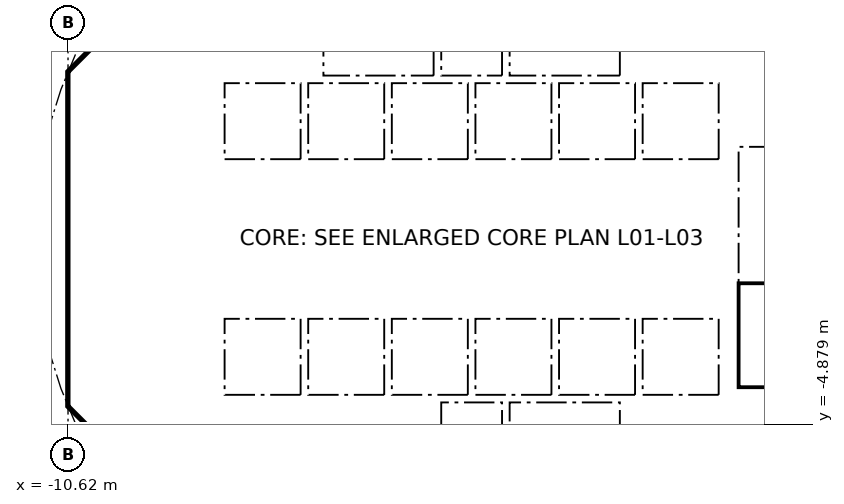
"""IFC4 building model, lengths in metres.
Left out: names, types, materials, properties, quantities, classifications, styles, units other than length and angle.
Written with IfcOpenShell. Run it as: python <this file> out.ifc"""

import sys

from ifc_helpers import new_model, si_unit, direction, frame, frame_2d, origin, place, context, subcontext, project, spatial, polyline, rectangle, outline, extrude, element, fill, save


model = new_model("IFC4")
c1 = context("Model", 3, precision=1e-05, world=origin(), true_north=direction((0.0, 1.0)))
c2 = subcontext(c1, "Body", "Model", "MODEL_VIEW")
j1 = project(units=[si_unit("LENGTHUNIT", "METRE"), si_unit("PLANEANGLEUNIT", "RADIAN")], contexts=[c1])
p1 = place(None, origin())
s1 = spatial("IfcSite", under=j1, at=p1, CompositionType="ELEMENT")
p2 = place(p1, origin())
s2 = spatial("IfcBuilding", under=s1, at=p2, CompositionType="ELEMENT")
p3 = place(p2, frame((0.0, 0.0, 12.0)))
s3 = spatial("IfcBuildingStorey", under=s2, at=p3, CompositionType="ELEMENT", Elevation=12.0)
p4 = place(p3, frame((9.988, 4.613, 0.0), z_axis=(0.0, 0.0, 1.0), x_axis=(-0.707106781187, 0.707106781187, 0.0)))
e1 = element("IfcWall", 1, at=p4, inside=s3, PredefinedType="SHEAR", context=c2, shape_type="SweptSolid", body=[
    extrude(rectangle(XDim=7.602, YDim=0.6, at=frame_2d((3.801, 0.0))), origin(), (0.0, 0.0, 1.0), 4.7),
])
p5 = place(p4, frame((3.201, 0.0, 0.0)))
e2 = element("IfcOpeningElement", 2, at=p5, cuts=e1, PredefinedType="OPENING", context=c2, shape_type="SweptSolid", body=[
    extrude(rectangle(XDim=1.2, YDim=2.1, at=frame_2d((0.6, 1.05))), frame((0.0, 0.31, 0.0), z_axis=(0.0, -1.0, 0.0), x_axis=(1.0, 0.0, 0.0)), (0.0, 0.0, 1.0), 0.62),
])
p6 = place(p3, frame((-4.613, 9.988, 0.0), z_axis=(0.0, 0.0, 1.0), x_axis=(-0.707106781187, -0.707106781187, 0.0)))
e3 = element("IfcWall", 3, at=p6, inside=s3, PredefinedType="SHEAR", context=c2, shape_type="SweptSolid", body=[
    extrude(rectangle(XDim=7.602, YDim=0.6, at=frame_2d((3.801, 0.0))), origin(), (0.0, 0.0, 1.0), 4.7),
])
p7 = place(p6, frame((0.351, 0.0, 0.0)))
e4 = element("IfcOpeningElement", 4, at=p7, cuts=e3, PredefinedType="OPENING", context=c2, shape_type="SweptSolid", body=[
    extrude(rectangle(XDim=1.1, YDim=2.1, at=frame_2d((0.55, 1.05))), frame((0.0, 0.31, 0.0), z_axis=(0.0, -1.0, 0.0), x_axis=(1.0, 0.0, 0.0)), (0.0, 0.0, 1.0), 0.62),
])
p8 = place(p3, frame((-10.325, 3.801, 0.0), z_axis=(0.0, 0.0, 1.0), x_axis=(0.0, -1.0, 0.0)))
e5 = element("IfcWall", 5, at=p8, inside=s3, PredefinedType="SHEAR", context=c2, shape_type="SweptSolid", body=[
    extrude(rectangle(XDim=7.602, YDim=0.6, at=frame_2d((3.801, 0.0))), origin(), (0.0, 0.0, 1.0), 4.7),
])
p9 = place(p8, frame((0.651, 0.0, 0.0)))
e6 = element("IfcOpeningElement", 6, at=p9, cuts=e5, PredefinedType="OPENING", context=c2, shape_type="SweptSolid", body=[
    extrude(rectangle(XDim=1.5, YDim=2.1, at=frame_2d((0.75, 1.05))), frame((0.0, 0.31, 0.0), z_axis=(0.0, -1.0, 0.0), x_axis=(1.0, 0.0, 0.0)), (0.0, 0.0, 1.0), 0.62),
])
p10 = place(p8, frame((5.451, 0.0, 0.0)))
e7 = element("IfcOpeningElement", 7, at=p10, cuts=e5, PredefinedType="OPENING", context=c2, shape_type="SweptSolid", body=[
    extrude(rectangle(XDim=1.5, YDim=2.1, at=frame_2d((0.75, 1.05))), frame((0.0, 0.31, 0.0), z_axis=(0.0, -1.0, 0.0), x_axis=(1.0, 0.0, 0.0)), (0.0, 0.0, 1.0), 0.62),
])
p11 = place(p3, frame((-9.988, -4.613, 0.0), z_axis=(0.0, 0.0, 1.0), x_axis=(0.707106781187, -0.707106781187, 0.0)))
e8 = element("IfcWall", 8, at=p11, inside=s3, PredefinedType="SHEAR", context=c2, shape_type="SweptSolid", body=[
    extrude(rectangle(XDim=7.602, YDim=0.6, at=frame_2d((3.801, 0.0))), origin(), (0.0, 0.0, 1.0), 4.7),
])
p12 = place(p11, frame((6.151, 0.0, 0.0)))
e9 = element("IfcOpeningElement", 9, at=p12, cuts=e8, PredefinedType="OPENING", context=c2, shape_type="SweptSolid", body=[
    extrude(rectangle(XDim=1.1, YDim=2.1, at=frame_2d((0.55, 1.05))), frame((0.0, 0.31, 0.0), z_axis=(0.0, -1.0, 0.0), x_axis=(1.0, 0.0, 0.0)), (0.0, 0.0, 1.0), 0.62),
])
p13 = place(p3, frame((4.613, -9.988, 0.0), z_axis=(0.0, 0.0, 1.0), x_axis=(0.707106781187, 0.707106781187, 0.0)))
e10 = element("IfcWall", 10, at=p13, inside=s3, PredefinedType="SHEAR", context=c2, shape_type="SweptSolid", body=[
    extrude(rectangle(XDim=7.602, YDim=0.6, at=frame_2d((3.801, 0.0))), origin(), (0.0, 0.0, 1.0), 4.7),
])
p14 = place(p13, frame((3.201, 0.0, 0.0)))
e11 = element("IfcOpeningElement", 11, at=p14, cuts=e10, PredefinedType="OPENING", context=c2, shape_type="SweptSolid", body=[
    extrude(rectangle(XDim=1.2, YDim=2.1, at=frame_2d((0.6, 1.05))), frame((0.0, 0.31, 0.0), z_axis=(0.0, -1.0, 0.0), x_axis=(1.0, 0.0, 0.0)), (0.0, 0.0, 1.0), 0.62),
])
p15 = place(p3, frame((-5.8, 4.3, 0.0), z_axis=(0.0, 0.0, 1.0), x_axis=(0.0, 1.0, 0.0)))
e12 = element("IfcWall", 12, at=p15, inside=s3, PredefinedType="PARTITIONING", context=c2, shape_type="SweptSolid", body=[
    extrude(rectangle(XDim=3.927, YDim=0.15, at=frame_2d((1.963, 0.0))), origin(), (0.0, 0.0, 1.0), 4.7),
])
p16 = place(p15, frame((1.551, 0.0, 0.0)))
e13 = element("IfcOpeningElement", 13, at=p16, cuts=e12, PredefinedType="OPENING", context=c2, shape_type="SweptSolid", body=[
    extrude(rectangle(XDim=0.9, YDim=2.1, at=frame_2d((0.45, 1.05))), frame((0.0, 0.085, 0.0), z_axis=(0.0, -1.0, 0.0), x_axis=(1.0, 0.0, 0.0)), (0.0, 0.0, 1.0), 0.17),
])
p17 = place(p3, frame((4.0, 4.3, 0.0), z_axis=(0.0, 0.0, 1.0), x_axis=(0.0, 1.0, 0.0)))
e14 = element("IfcWall", 14, at=p17, inside=s3, PredefinedType="SOLIDWALL", context=c2, shape_type="SweptSolid", body=[
    extrude(rectangle(XDim=2.2, YDim=0.2, at=frame_2d((1.1, 0.0))), origin(), (0.0, 0.0, 1.0), 4.7),
])
p18 = place(p17, frame((0.55, 0.0, 0.0)))
e15 = element("IfcOpeningElement", 15, at=p18, cuts=e14, PredefinedType="OPENING", context=c2, shape_type="SweptSolid", body=[
    extrude(rectangle(XDim=1.1, YDim=2.1, at=frame_2d((0.55, 1.05))), frame((0.0, 0.11, 0.0), z_axis=(0.0, -1.0, 0.0), x_axis=(1.0, 0.0, 0.0)), (0.0, 0.0, 1.0), 0.22),
])
p19 = place(p3, frame((-4.0, 4.3, 0.0), z_axis=(0.0, 0.0, 1.0), x_axis=(0.0, 1.0, 0.0)))
e16 = element("IfcWall", 16, at=p19, inside=s3, PredefinedType="SOLIDWALL", context=c2, shape_type="SweptSolid", body=[
    extrude(rectangle(XDim=2.2, YDim=0.2, at=frame_2d((1.1, 0.0))), origin(), (0.0, 0.0, 1.0), 4.7),
])
p20 = place(p19, frame((0.55, 0.0, 0.0)))
e17 = element("IfcOpeningElement", 17, at=p20, cuts=e16, PredefinedType="OPENING", context=c2, shape_type="SweptSolid", body=[
    extrude(rectangle(XDim=1.1, YDim=2.1, at=frame_2d((0.55, 1.05))), frame((0.0, 0.11, 0.0), z_axis=(0.0, -1.0, 0.0), x_axis=(1.0, 0.0, 0.0)), (0.0, 0.0, 1.0), 0.22),
])
p21 = place(p3, frame((-6.7, 2.0, 0.0), z_axis=(0.0, 0.0, 1.0), x_axis=(1.0, 0.0, 0.0)))
e18 = element("IfcWall", 18, at=p21, inside=s3, PredefinedType="SOLIDWALL", context=c2, shape_type="SweptSolid", body=[
    extrude(rectangle(XDim=13.4, YDim=0.2, at=frame_2d((6.7, 0.0))), origin(), (0.0, 0.0, 1.0), 4.7),
])
p22 = place(p21, frame((0.65, 0.0, 0.0)))
e19 = element("IfcOpeningElement", 19, at=p22, cuts=e18, PredefinedType="OPENING", context=c2, shape_type="SweptSolid", body=[
    extrude(rectangle(XDim=1.1, YDim=2.1, at=frame_2d((0.55, 1.05))), frame((0.0, 0.11, 0.0), z_axis=(0.0, -1.0, 0.0), x_axis=(1.0, 0.0, 0.0)), (0.0, 0.0, 1.0), 0.22),
])
p23 = place(p21, frame((2.85, 0.0, 0.0)))
e20 = element("IfcOpeningElement", 20, at=p23, cuts=e18, PredefinedType="OPENING", context=c2, shape_type="SweptSolid", body=[
    extrude(rectangle(XDim=1.1, YDim=2.1, at=frame_2d((0.55, 1.05))), frame((0.0, 0.11, 0.0), z_axis=(0.0, -1.0, 0.0), x_axis=(1.0, 0.0, 0.0)), (0.0, 0.0, 1.0), 0.22),
])
p24 = place(p21, frame((5.05, 0.0, 0.0)))
e21 = element("IfcOpeningElement", 21, at=p24, cuts=e18, PredefinedType="OPENING", context=c2, shape_type="SweptSolid", body=[
    extrude(rectangle(XDim=1.1, YDim=2.1, at=frame_2d((0.55, 1.05))), frame((0.0, 0.11, 0.0), z_axis=(0.0, -1.0, 0.0), x_axis=(1.0, 0.0, 0.0)), (0.0, 0.0, 1.0), 0.22),
])
p25 = place(p3, frame((6.7, 4.0, 0.0), z_axis=(0.0, 0.0, 1.0), x_axis=(1.0, 0.0, 0.0)))
e22 = element("IfcWall", 22, at=p25, inside=s3, PredefinedType="SOLIDWALL", context=c2, shape_type="SweptSolid", body=[
    extrude(rectangle(XDim=3.325, YDim=0.2, at=frame_2d((1.662, 0.0))), origin(), (0.0, 0.0, 1.0), 4.7),
])
p26 = place(p25, frame((1.25, 0.0, 0.0)))
e23 = element("IfcOpeningElement", 23, at=p26, cuts=e22, PredefinedType="OPENING", context=c2, shape_type="SweptSolid", body=[
    extrude(rectangle(XDim=1.1, YDim=2.1, at=frame_2d((0.55, 1.05))), frame((0.0, 0.11, 0.0), z_axis=(0.0, -1.0, 0.0), x_axis=(1.0, 0.0, 0.0)), (0.0, 0.0, 1.0), 0.22),
])
p27 = place(p3, frame((-5.8, -8.227, 0.0), z_axis=(0.0, 0.0, 1.0), x_axis=(0.0, 1.0, 0.0)))
e24 = element("IfcWall", 24, at=p27, inside=s3, PredefinedType="PARTITIONING", context=c2, shape_type="SweptSolid", body=[
    extrude(rectangle(XDim=3.927, YDim=0.15, at=frame_2d((1.963, 0.0))), origin(), (0.0, 0.0, 1.0), 4.7),
])
p28 = place(p27, frame((1.476, 0.0, 0.0)))
e25 = element("IfcOpeningElement", 25, at=p28, cuts=e24, PredefinedType="OPENING", context=c2, shape_type="SweptSolid", body=[
    extrude(rectangle(XDim=0.9, YDim=2.1, at=frame_2d((0.45, 1.05))), frame((0.0, 0.085, 0.0), z_axis=(0.0, -1.0, 0.0), x_axis=(1.0, 0.0, 0.0)), (0.0, 0.0, 1.0), 0.17),
])
p29 = place(p3, frame((4.0, -6.5, 0.0), z_axis=(0.0, 0.0, 1.0), x_axis=(0.0, 1.0, 0.0)))
e26 = element("IfcWall", 26, at=p29, inside=s3, PredefinedType="SOLIDWALL", context=c2, shape_type="SweptSolid", body=[
    extrude(rectangle(XDim=2.2, YDim=0.2, at=frame_2d((1.1, 0.0))), origin(), (0.0, 0.0, 1.0), 4.7),
])
p30 = place(p29, frame((0.55, 0.0, 0.0)))
e27 = element("IfcOpeningElement", 27, at=p30, cuts=e26, PredefinedType="OPENING", context=c2, shape_type="SweptSolid", body=[
    extrude(rectangle(XDim=1.1, YDim=2.1, at=frame_2d((0.55, 1.05))), frame((0.0, 0.11, 0.0), z_axis=(0.0, -1.0, 0.0), x_axis=(1.0, 0.0, 0.0)), (0.0, 0.0, 1.0), 0.22),
])
p31 = place(p3, frame((-4.0, -6.5, 0.0), z_axis=(0.0, 0.0, 1.0), x_axis=(0.0, 1.0, 0.0)))
e28 = element("IfcWall", 28, at=p31, inside=s3, PredefinedType="SOLIDWALL", context=c2, shape_type="SweptSolid", body=[
    extrude(rectangle(XDim=2.2, YDim=0.2, at=frame_2d((1.1, 0.0))), origin(), (0.0, 0.0, 1.0), 4.7),
])
p32 = place(p31, frame((0.65, 0.0, 0.0)))
e29 = element("IfcOpeningElement", 29, at=p32, cuts=e28, PredefinedType="OPENING", context=c2, shape_type="SweptSolid", body=[
    extrude(rectangle(XDim=0.9, YDim=2.1, at=frame_2d((0.45, 1.05))), frame((0.0, 0.11, 0.0), z_axis=(0.0, -1.0, 0.0), x_axis=(1.0, 0.0, 0.0)), (0.0, 0.0, 1.0), 0.22),
])
p33 = place(p3, frame((-6.7, -2.0, 0.0), z_axis=(0.0, 0.0, 1.0), x_axis=(1.0, 0.0, 0.0)))
e30 = element("IfcWall", 30, at=p33, inside=s3, PredefinedType="SOLIDWALL", context=c2, shape_type="SweptSolid", body=[
    extrude(rectangle(XDim=13.4, YDim=0.2, at=frame_2d((6.7, 0.0))), origin(), (0.0, 0.0, 1.0), 4.7),
])
p34 = place(p33, frame((0.65, 0.0, 0.0)))
e31 = element("IfcOpeningElement", 31, at=p34, cuts=e30, PredefinedType="OPENING", context=c2, shape_type="SweptSolid", body=[
    extrude(rectangle(XDim=1.1, YDim=2.1, at=frame_2d((0.55, 1.05))), frame((0.0, 0.11, 0.0), z_axis=(0.0, -1.0, 0.0), x_axis=(1.0, 0.0, 0.0)), (0.0, 0.0, 1.0), 0.22),
])
p35 = place(p33, frame((2.85, 0.0, 0.0)))
e32 = element("IfcOpeningElement", 32, at=p35, cuts=e30, PredefinedType="OPENING", context=c2, shape_type="SweptSolid", body=[
    extrude(rectangle(XDim=1.1, YDim=2.1, at=frame_2d((0.55, 1.05))), frame((0.0, 0.11, 0.0), z_axis=(0.0, -1.0, 0.0), x_axis=(1.0, 0.0, 0.0)), (0.0, 0.0, 1.0), 0.22),
])
p36 = place(p3, origin())
e33 = element("IfcWall", 33, at=p36, inside=s3, PredefinedType="SHEAR", context=c2, shape_type="SweptSolid", body=[
    extrude(outline(polyline([(-10.625, -3.801), (-10.025, -3.801), (-10.025, -4.152), (-9.776, -4.401), (-10.2, -4.825), (-10.625, -4.401), (-10.625, -3.801)])), origin(), (0.0, 0.0, 1.0), 4.7),
])
p37 = place(p3, origin())
e34 = element("IfcWall", 34, at=p37, inside=s3, PredefinedType="SHEAR", context=c2, shape_type="SweptSolid", body=[
    extrude(outline(polyline([(-10.2, 4.825), (-9.776, 4.401), (-10.025, 4.152), (-10.025, 3.801), (-10.625, 3.801), (-10.625, 4.401), (-10.2, 4.825)])), origin(), (0.0, 0.0, 1.0), 4.7),
])
for number, where, z_axis, x_axis in (
    (35, (-0.9, -6.5, 0.0), (0.0, 0.0, 1.0), (0.0, 1.0, 0.0)),
    (36, (0.9, -6.5, 0.0), (0.0, 0.0, 1.0), (0.0, 1.0, 0.0)),
):
    element("IfcWall", number, at=place(p3, frame(where, z_axis=z_axis, x_axis=x_axis)), inside=s3, PredefinedType="SOLIDWALL", context=c2, shape_type="SweptSolid", body=[
        extrude(rectangle(XDim=2.2, YDim=0.2, at=frame_2d((1.1, 0.0))), origin(), (0.0, 0.0, 1.0), 4.7),
    ])
p38 = place(p3, origin())
e37 = element("IfcWall", 37, at=p38, inside=s3, PredefinedType="SOLIDWALL", context=c2, shape_type="SweptSolid", body=[
    extrude(outline(polyline([(-6.7, -2.1), (-6.5, -2.1), (-6.5, -4.1), (-4.5, -4.1), (-4.5, -2.1), (-4.3, -2.1), (-4.3, -4.1), (-2.3, -4.1), (-2.3, -2.1), (-2.1, -2.1), (-2.1, -4.1), (-0.1, -4.1), (-0.1, -2.1), (0.1, -2.1), (0.1, -4.1), (2.1, -4.1), (2.1, -2.1), (2.3, -2.1), (2.3, -4.1), (4.3, -4.1), (4.3, -2.1), (4.5, -2.1), (4.5, -4.1), (6.5, -4.1), (6.5, -2.1), (6.7, -2.1), (6.7, -4.3), (-6.7, -4.3), (-6.7, -2.1)])), origin(), (0.0, 0.0, 1.0), 4.7),
])
for number, where, z_axis, x_axis in (
    (38, (-0.9, 4.3, 0.0), (0.0, 0.0, 1.0), (0.0, 1.0, 0.0)),
    (39, (0.9, 4.3, 0.0), (0.0, 0.0, 1.0), (0.0, 1.0, 0.0)),
):
    element("IfcWall", number, at=place(p3, frame(where, z_axis=z_axis, x_axis=x_axis)), inside=s3, PredefinedType="SOLIDWALL", context=c2, shape_type="SweptSolid", body=[
        extrude(rectangle(XDim=2.2, YDim=0.2, at=frame_2d((1.1, 0.0))), origin(), (0.0, 0.0, 1.0), 4.7),
    ])
p39 = place(p3, origin())
e40 = element("IfcWall", 40, at=p39, inside=s3, PredefinedType="SOLIDWALL", context=c2, shape_type="SweptSolid", body=[
    extrude(outline(polyline([(-6.5, 2.1), (-6.7, 2.1), (-6.7, 4.3), (6.7, 4.3), (6.7, 2.1), (6.5, 2.1), (6.5, 4.1), (4.5, 4.1), (4.5, 2.1), (4.3, 2.1), (4.3, 4.1), (2.3, 4.1), (2.3, 2.1), (2.1, 2.1), (2.1, 4.1), (0.1, 4.1), (0.1, 2.1), (-0.1, 2.1), (-0.1, 4.1), (-2.1, 4.1), (-2.1, 2.1), (-2.3, 2.1), (-2.3, 4.1), (-4.3, 4.1), (-4.3, 2.1), (-4.5, 2.1), (-4.5, 4.1), (-6.5, 4.1), (-6.5, 2.1)])), origin(), (0.0, 0.0, 1.0), 4.7),
])
for number, where, z_axis, x_axis in (
    (41, (-10.025, -4.0, 0.0), (0.0, 0.0, 1.0), (1.0, 0.0, 0.0)),
    (42, (-10.025, 4.0, 0.0), (0.0, 0.0, 1.0), (1.0, 0.0, 0.0)),
):
    element("IfcWall", number, at=place(p3, frame(where, z_axis=z_axis, x_axis=x_axis)), inside=s3, PredefinedType="PARTITIONING", context=c2, shape_type="SweptSolid", body=[
        extrude(rectangle(XDim=3.325, YDim=0.2, at=frame_2d((1.662, 0.0))), origin(), (0.0, 0.0, 1.0), 4.7),
    ])
p40 = place(p3, origin())
e43 = element("IfcWall", 43, at=p40, inside=s3, PredefinedType="SOLIDWALL", context=c2, shape_type="SweptSolid", body=[
    extrude(outline(polyline([(7.025, -3.9), (6.7, -3.9), (6.7, 3.9), (7.025, 3.9), (7.025, -3.9)])), origin(), (0.0, 0.0, 1.0), 4.7),
])
p41 = place(p3, origin())
e44 = element("IfcWall", 44, at=p41, inside=s3, PredefinedType="SOLIDWALL", context=c2, shape_type="SweptSolid", body=[
    extrude(outline(polyline([(10.025, -4.1), (6.7, -4.1), (6.7, -3.9), (10.025, -3.9), (10.025, -4.1)])), origin(), (0.0, 0.0, 1.0), 4.7),
])
p42 = place(p22, origin())
e45 = element("IfcDoor", 45, at=p42, inside=s3, OperationType="DOUBLE_DOOR_SLIDING", PredefinedType="DOOR", context=c2, shape_type="SweptSolid", body=[
    extrude(rectangle(XDim=1.1, YDim=2.1, at=frame_2d((0.55, 1.05))), frame((0.0, 0.025, 0.0), z_axis=(0.0, -1.0, 0.0), x_axis=(1.0, 0.0, 0.0)), (0.0, 0.0, 1.0), 0.05),
])
fill(e19, e45)
p43 = place(p23, origin())
e46 = element("IfcDoor", 46, at=p43, inside=s3, OperationType="DOUBLE_DOOR_SLIDING", PredefinedType="DOOR", context=c2, shape_type="SweptSolid", body=[
    extrude(rectangle(XDim=1.1, YDim=2.1, at=frame_2d((0.55, 1.05))), frame((0.0, 0.025, 0.0), z_axis=(0.0, -1.0, 0.0), x_axis=(1.0, 0.0, 0.0)), (0.0, 0.0, 1.0), 0.05),
])
fill(e20, e46)
p44 = place(p24, origin())
e47 = element("IfcDoor", 47, at=p44, inside=s3, OperationType="DOUBLE_DOOR_SLIDING", PredefinedType="DOOR", context=c2, shape_type="SweptSolid", body=[
    extrude(rectangle(XDim=1.1, YDim=2.1, at=frame_2d((0.55, 1.05))), frame((0.0, 0.025, 0.0), z_axis=(0.0, -1.0, 0.0), x_axis=(1.0, 0.0, 0.0)), (0.0, 0.0, 1.0), 0.05),
])
fill(e21, e47)
p45 = place(p34, origin())
e48 = element("IfcDoor", 48, at=p45, inside=s3, OperationType="DOUBLE_DOOR_SLIDING", PredefinedType="DOOR", context=c2, shape_type="SweptSolid", body=[
    extrude(rectangle(XDim=1.1, YDim=2.1, at=frame_2d((0.55, 1.05))), frame((0.0, 0.025, 0.0), z_axis=(0.0, -1.0, 0.0), x_axis=(1.0, 0.0, 0.0)), (0.0, 0.0, 1.0), 0.05),
])
fill(e31, e48)
p46 = place(p35, origin())
e49 = element("IfcDoor", 49, at=p46, inside=s3, OperationType="DOUBLE_DOOR_SLIDING", PredefinedType="DOOR", context=c2, shape_type="SweptSolid", body=[
    extrude(rectangle(XDim=1.1, YDim=2.1, at=frame_2d((0.55, 1.05))), frame((0.0, 0.025, 0.0), z_axis=(0.0, -1.0, 0.0), x_axis=(1.0, 0.0, 0.0)), (0.0, 0.0, 1.0), 0.05),
])
fill(e32, e49)
p47 = place(p18, origin())
e50 = element("IfcDoor", 50, at=p47, inside=s3, OperationType="DOUBLE_DOOR_SLIDING", PredefinedType="DOOR", context=c2, shape_type="SweptSolid", body=[
    extrude(rectangle(XDim=1.1, YDim=2.1, at=frame_2d((0.55, 1.05))), frame((0.0, 0.025, 0.0), z_axis=(0.0, -1.0, 0.0), x_axis=(1.0, 0.0, 0.0)), (0.0, 0.0, 1.0), 0.05),
])
fill(e15, e50)
p48 = place(p30, origin())
e51 = element("IfcDoor", 51, at=p48, inside=s3, OperationType="DOUBLE_DOOR_SLIDING", PredefinedType="DOOR", context=c2, shape_type="SweptSolid", body=[
    extrude(rectangle(XDim=1.1, YDim=2.1, at=frame_2d((0.55, 1.05))), frame((0.0, 0.025, 0.0), z_axis=(0.0, -1.0, 0.0), x_axis=(1.0, 0.0, 0.0)), (0.0, 0.0, 1.0), 0.05),
])
fill(e27, e51)
p49 = place(p20, origin())
e52 = element("IfcDoor", 52, at=p49, inside=s3, OperationType="DOUBLE_DOOR_SLIDING", PredefinedType="DOOR", context=c2, shape_type="SweptSolid", body=[
    extrude(rectangle(XDim=1.1, YDim=2.1, at=frame_2d((0.55, 1.05))), frame((0.0, 0.025, 0.0), z_axis=(0.0, -1.0, 0.0), x_axis=(1.0, 0.0, 0.0)), (0.0, 0.0, 1.0), 0.05),
])
fill(e17, e52)
p50 = place(p9, origin())
e53 = element("IfcDoor", 53, at=p50, inside=s3, OperationType="DOUBLE_DOOR_SINGLE_SWING", PredefinedType="DOOR", context=c2, shape_type="SweptSolid", body=[
    extrude(rectangle(XDim=1.5, YDim=2.1, at=frame_2d((0.75, 1.05))), frame((0.0, 0.025, 0.0), z_axis=(0.0, -1.0, 0.0), x_axis=(1.0, 0.0, 0.0)), (0.0, 0.0, 1.0), 0.05),
])
fill(e6, e53)
p51 = place(p10, origin())
e54 = element("IfcDoor", 54, at=p51, inside=s3, OperationType="DOUBLE_DOOR_SINGLE_SWING", PredefinedType="DOOR", context=c2, shape_type="SweptSolid", body=[
    extrude(rectangle(XDim=1.5, YDim=2.1, at=frame_2d((0.75, 1.05))), frame((0.0, 0.025, 0.0), z_axis=(0.0, -1.0, 0.0), x_axis=(1.0, 0.0, 0.0)), (0.0, 0.0, 1.0), 0.05),
])
fill(e7, e54)
save(model, sys.argv[1])
